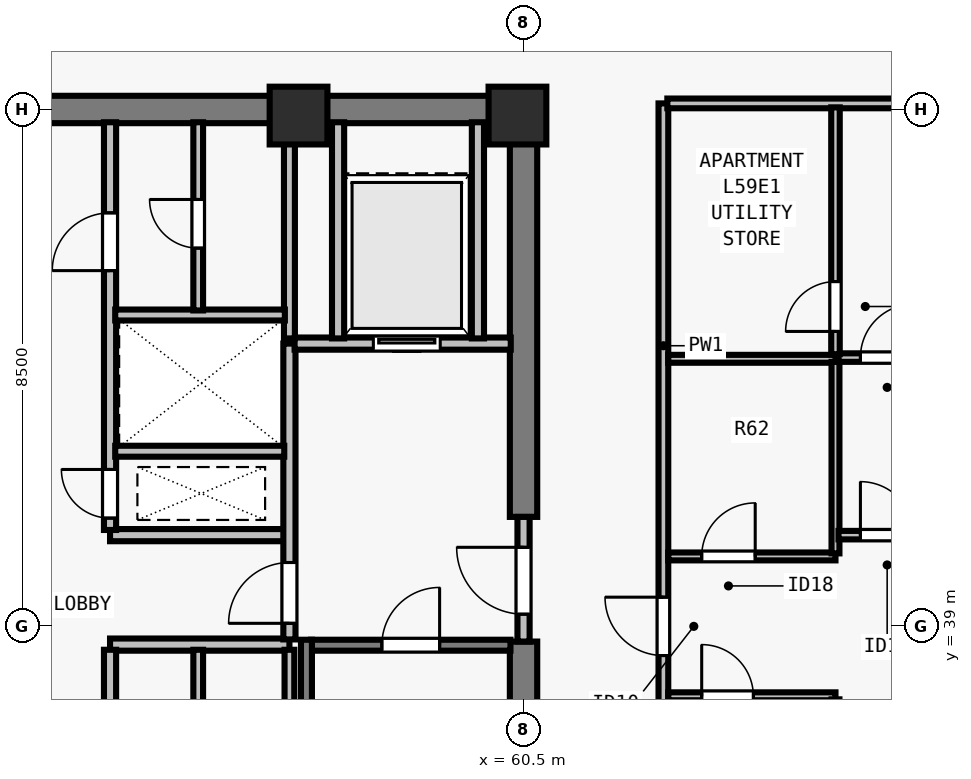
"""IFC4 building model, lengths in metres.
Left out: names, types, materials, properties, quantities, classifications, styles, units other than length and angle.
Written with IfcOpenShell. Run it as: python <this file> out.ifc"""

import sys

from ifc_helpers import new_model, si_unit, direction, frame, frame_2d, origin, origin_2d, place, context, subcontext, project, spatial, rectangle, extrude, element, fill, save


model = new_model("IFC4")
c1 = context("Model", 3, precision=1e-05, world=origin(), true_north=direction((0.0, 1.0)))
c2 = subcontext(c1, "Body", "Model", "MODEL_VIEW")
j1 = project(units=[si_unit("LENGTHUNIT", "METRE"), si_unit("PLANEANGLEUNIT", "RADIAN")], contexts=[c1])
p1 = place(None, origin())
s1 = spatial("IfcSite", under=j1, at=p1, CompositionType="ELEMENT")
p2 = place(p1, origin())
s2 = spatial("IfcBuilding", under=s1, at=p2, CompositionType="ELEMENT")
p3 = place(p2, frame((0.0, 0.0, 216.5)))
s3 = spatial("IfcBuildingStorey", under=s2, at=p3, CompositionType="ELEMENT", Elevation=216.5)
for number, where, z_axis, x_axis in (
    (1, (56.8, 47.4, 0.0), (0.0, 0.0, 1.0), (1.0, 0.0, 0.0)),
    (2, (60.4, 47.4, 0.0), (0.0, 0.0, 1.0), (1.0, 0.0, 0.0)),
):
    element("IfcColumn", number, at=place(p3, frame(where, z_axis=z_axis, x_axis=x_axis)), inside=s3, PredefinedType="COLUMN", context=c2, shape_type="SweptSolid", body=[
        extrude(rectangle(XDim=0.95, YDim=0.95, at=origin_2d()), origin(), (0.0, 0.0, 1.0), 3.5),
    ])
p4 = place(p3, frame((43.275, 47.5, 0.0), z_axis=(0.0, 0.0, 1.0), x_axis=(1.0, 0.0, 0.0)))
e3 = element("IfcWall", 3, at=p4, inside=s3, PredefinedType="SHEAR", context=c2, shape_type="SweptSolid", body=[
    extrude(rectangle(XDim=17.45, YDim=0.45, at=frame_2d((8.725, 0.0))), origin(), (0.0, 0.0, 1.0), 3.29),
])
p5 = place(p3, frame((60.5, 30.715, 0.0), z_axis=(0.0, 0.0, 1.0), x_axis=(0.0, 1.0, 0.0)))
e4 = element("IfcWall", 4, at=p5, inside=s3, PredefinedType="SHEAR", context=c2, shape_type="SweptSolid", body=[
    extrude(rectangle(XDim=8.035, YDim=0.45, at=frame_2d((4.018, 0.0))), origin(), (0.0, 0.0, 1.0), 3.29),
])
p6 = place(p3, frame((60.5, 40.8, 0.0), z_axis=(0.0, 0.0, 1.0), x_axis=(0.0, 1.0, 0.0)))
e5 = element("IfcWall", 5, at=p6, inside=s3, PredefinedType="SHEAR", context=c2, shape_type="SweptSolid", body=[
    extrude(rectangle(XDim=6.485, YDim=0.45, at=frame_2d((3.242, 0.0))), origin(), (0.0, 0.0, 1.0), 3.29),
])
for number, where, z_axis, x_axis in (
    (6, (53.7, 38.7, 0.0), (0.0, 0.0, 1.0), (1.0, 0.0, 0.0)),
    (7, (53.7, 40.5, 0.0), (0.0, 0.0, 1.0), (1.0, 0.0, 0.0)),
):
    element("IfcWall", number, at=place(p3, frame(where, z_axis=z_axis, x_axis=x_axis)), inside=s3, PredefinedType="SOLIDWALL", context=c2, shape_type="SweptSolid", body=[
        extrude(rectangle(XDim=2.95, YDim=0.2, at=frame_2d((1.475, 0.0))), origin(), (0.0, 0.0, 1.0), 3.29),
    ])
p7 = place(p3, frame((53.7, 30.71, 0.0), z_axis=(0.0, 0.0, 1.0), x_axis=(0.0, 1.0, 0.0)))
e8 = element("IfcWall", 8, at=p7, inside=s3, PredefinedType="SOLIDWALL", context=c2, shape_type="SweptSolid", body=[
    extrude(rectangle(XDim=7.905, YDim=0.2, at=frame_2d((3.953, 0.0))), origin(), (0.0, 0.0, 1.0), 3.29),
])
p8 = place(p7, frame((2.14, 0.0, 0.0)))
e9 = element("IfcOpeningElement", 9, at=p8, cuts=e8, PredefinedType="OPENING", context=c2, shape_type="SweptSolid", body=[
    extrude(rectangle(XDim=0.95, YDim=2.12, at=frame_2d((0.475, 1.06))), frame((0.0, 0.11, 0.0), z_axis=(0.0, -1.0, 0.0), x_axis=(1.0, 0.0, 0.0)), (0.0, 0.0, 1.0), 0.22),
])
p9 = place(p3, frame((53.7, 40.585, 0.0), z_axis=(0.0, 0.0, 1.0), x_axis=(0.0, 1.0, 0.0)))
e10 = element("IfcWall", 10, at=p9, inside=s3, PredefinedType="SOLIDWALL", context=c2, shape_type="SweptSolid", body=[
    extrude(rectangle(XDim=6.705, YDim=0.2, at=frame_2d((3.353, 0.0))), origin(), (0.0, 0.0, 1.0), 3.29),
])
p10 = place(p9, frame((0.195, 0.0, 0.0)))
e11 = element("IfcOpeningElement", 11, at=p10, cuts=e10, PredefinedType="OPENING", context=c2, shape_type="SweptSolid", body=[
    extrude(rectangle(XDim=0.8, YDim=2.08, at=frame_2d((0.4, 1.04))), frame((0.0, 0.11, 0.0), z_axis=(0.0, -1.0, 0.0), x_axis=(1.0, 0.0, 0.0)), (0.0, 0.0, 1.0), 0.22),
])
p11 = place(p9, frame((4.265, 0.0, 0.0)))
e12 = element("IfcOpeningElement", 12, at=p11, cuts=e10, PredefinedType="OPENING", context=c2, shape_type="SweptSolid", body=[
    extrude(rectangle(XDim=0.95, YDim=2.12, at=frame_2d((0.475, 1.06))), frame((0.0, 0.11, 0.0), z_axis=(0.0, -1.0, 0.0), x_axis=(1.0, 0.0, 0.0)), (0.0, 0.0, 1.0), 0.22),
])
p12 = place(p3, frame((60.5, 38.75, 0.0), z_axis=(0.0, 0.0, 1.0), x_axis=(0.0, 1.0, 0.0)))
e13 = element("IfcWall", 13, at=p12, inside=s3, PredefinedType="SOLIDWALL", context=c2, shape_type="SweptSolid", body=[
    extrude(rectangle(XDim=2.05, YDim=0.2, at=frame_2d((1.025, 0.0))), origin(), (0.0, 0.0, 1.0), 3.29),
])
p13 = place(p12, frame((0.45, 0.0, 0.0)))
e14 = element("IfcOpeningElement", 14, at=p13, cuts=e13, PredefinedType="OPENING", context=c2, shape_type="SweptSolid", body=[
    extrude(rectangle(XDim=1.1, YDim=2.15, at=frame_2d((0.55, 1.075))), frame((0.0, 0.11, 0.0), z_axis=(0.0, -1.0, 0.0), x_axis=(1.0, 0.0, 0.0)), (0.0, 0.0, 1.0), 0.22),
])
p14 = place(p3, frame((56.65, 38.785, 0.0), z_axis=(0.0, 0.0, 1.0), x_axis=(0.0, 1.0, 0.0)))
e15 = element("IfcWall", 15, at=p14, inside=s3, PredefinedType="SOLIDWALL", context=c2, shape_type="SweptSolid", body=[
    extrude(rectangle(XDim=4.865, YDim=0.2, at=frame_2d((2.433, 0.0))), origin(), (0.0, 0.0, 1.0), 3.29),
])
p15 = place(p14, frame((0.265, 0.0, 0.0)))
e16 = element("IfcOpeningElement", 16, at=p15, cuts=e15, PredefinedType="OPENING", context=c2, shape_type="SweptSolid", body=[
    extrude(rectangle(XDim=1.0, YDim=2.15, at=frame_2d((0.5, 1.075))), frame((0.0, 0.11, 0.0), z_axis=(0.0, -1.0, 0.0), x_axis=(1.0, 0.0, 0.0)), (0.0, 0.0, 1.0), 0.22),
])
p16 = place(p3, frame((56.735, 43.65, 0.0), z_axis=(0.0, 0.0, 1.0), x_axis=(1.0, 0.0, 0.0)))
e17 = element("IfcWall", 17, at=p16, inside=s3, PredefinedType="SOLIDWALL", context=c2, shape_type="SweptSolid", body=[
    extrude(rectangle(XDim=3.555, YDim=0.2, at=frame_2d((1.777, 0.0))), origin(), (0.0, 0.0, 1.0), 3.29),
])
p17 = place(p16, frame((1.295, 0.0, 0.0)))
e18 = element("IfcOpeningElement", 18, at=p17, cuts=e17, PredefinedType="OPENING", context=c2, shape_type="SweptSolid", body=[
    extrude(rectangle(XDim=1.1, YDim=2.2, at=frame_2d((0.55, 1.1))), frame((0.0, 0.11, 0.0), z_axis=(0.0, -1.0, 0.0), x_axis=(1.0, 0.0, 0.0)), (0.0, 0.0, 1.0), 0.22),
])
for number, where, z_axis, x_axis in (
    (19, (57.45, 43.735, 0.0), (0.0, 0.0, 1.0), (0.0, 1.0, 0.0)),
    (20, (59.75, 43.735, 0.0), (0.0, 0.0, 1.0), (0.0, 1.0, 0.0)),
):
    element("IfcWall", number, at=place(p3, frame(where, z_axis=z_axis, x_axis=x_axis)), inside=s3, PredefinedType="SOLIDWALL", context=c2, shape_type="SweptSolid", body=[
        extrude(rectangle(XDim=3.555, YDim=0.2, at=frame_2d((1.777, 0.0))), origin(), (0.0, 0.0, 1.0), 3.29),
    ])
p18 = place(p3, frame((56.65, 30.71, 0.0), z_axis=(0.0, 0.0, 1.0), x_axis=(0.0, 1.0, 0.0)))
e21 = element("IfcWall", 21, at=p18, inside=s3, PredefinedType="PARTITIONING", context=c2, shape_type="SweptSolid", body=[
    extrude(rectangle(XDim=7.905, YDim=0.16, at=frame_2d((3.953, 0.0))), origin(), (0.0, 0.0, 1.0), 3.29),
])
p19 = place(p3, frame((55.15, 30.71, 0.0), z_axis=(0.0, 0.0, 1.0), x_axis=(0.0, 1.0, 0.0)))
e22 = element("IfcWall", 22, at=p19, inside=s3, PredefinedType="PARTITIONING", context=c2, shape_type="SweptSolid", body=[
    extrude(rectangle(XDim=7.905, YDim=0.16, at=frame_2d((3.953, 0.0))), origin(), (0.0, 0.0, 1.0), 3.29),
])
p20 = place(p19, frame((3.54, 0.0, 0.0)))
e23 = element("IfcOpeningElement", 23, at=p20, cuts=e22, PredefinedType="OPENING", context=c2, shape_type="SweptSolid", body=[
    extrude(rectangle(XDim=0.85, YDim=2.12, at=frame_2d((0.425, 1.06))), frame((0.0, 0.09, 0.0), z_axis=(0.0, -1.0, 0.0), x_axis=(1.0, 0.0, 0.0)), (0.0, 0.0, 1.0), 0.18),
])
p21 = place(p3, frame((56.65, 43.735, 0.0), z_axis=(0.0, 0.0, 1.0), x_axis=(0.0, 1.0, 0.0)))
e24 = element("IfcWall", 24, at=p21, inside=s3, PredefinedType="SOLIDWALL", context=c2, shape_type="SweptSolid", body=[
    extrude(rectangle(XDim=3.555, YDim=0.18, at=frame_2d((1.777, 0.0))), origin(), (0.0, 0.0, 1.0), 3.29),
])
p22 = place(p3, frame((53.785, 41.88, 0.0), z_axis=(0.0, 0.0, 1.0), x_axis=(1.0, 0.0, 0.0)))
e25 = element("IfcWall", 25, at=p22, inside=s3, PredefinedType="SOLIDWALL", context=c2, shape_type="SweptSolid", body=[
    extrude(rectangle(XDim=2.78, YDim=0.18, at=frame_2d((1.39, 0.0))), origin(), (0.0, 0.0, 1.0), 3.29),
])
p23 = place(p3, frame((53.785, 44.12, 0.0), z_axis=(0.0, 0.0, 1.0), x_axis=(1.0, 0.0, 0.0)))
e26 = element("IfcWall", 26, at=p23, inside=s3, PredefinedType="SOLIDWALL", context=c2, shape_type="SweptSolid", body=[
    extrude(rectangle(XDim=2.79, YDim=0.18, at=frame_2d((1.395, 0.0))), origin(), (0.0, 0.0, 1.0), 3.29),
])
p24 = place(p3, frame((55.15, 44.195, 0.0), z_axis=(0.0, 0.0, 1.0), x_axis=(0.0, 1.0, 0.0)))
e27 = element("IfcWall", 27, at=p24, inside=s3, PredefinedType="PARTITIONING", context=c2, shape_type="SweptSolid", body=[
    extrude(rectangle(XDim=3.095, YDim=0.16, at=frame_2d((1.547, 0.0))), origin(), (0.0, 0.0, 1.0), 3.29),
])
p25 = place(p24, frame((1.025, 0.0, 0.0)))
e28 = element("IfcOpeningElement", 28, at=p25, cuts=e27, PredefinedType="OPENING", context=c2, shape_type="SweptSolid", body=[
    extrude(rectangle(XDim=0.8, YDim=2.1, at=frame_2d((0.4, 1.05))), frame((0.0, 0.09, 0.0), z_axis=(0.0, -1.0, 0.0), x_axis=(1.0, 0.0, 0.0)), (0.0, 0.0, 1.0), 0.18),
])
p26 = place(p3, frame((62.8, 30.4, 0.0), z_axis=(0.0, 0.0, 1.0), x_axis=(0.0, 1.0, 0.0)))
e29 = element("IfcWall", 29, at=p26, inside=s3, PredefinedType="PARTITIONING", context=c2, shape_type="SweptSolid", body=[
    extrude(rectangle(XDim=17.2, YDim=0.16, at=frame_2d((8.6, 0.0))), origin(), (0.0, 0.0, 1.0), 3.29),
])
p27 = place(p26, frame((8.12, 0.0, 0.0)))
e30 = element("IfcOpeningElement", 30, at=p27, cuts=e29, PredefinedType="OPENING", context=c2, shape_type="SweptSolid", body=[
    extrude(rectangle(XDim=0.96, YDim=2.18, at=frame_2d((0.48, 1.09))), frame((0.0, 0.09, 0.0), z_axis=(0.0, -1.0, 0.0), x_axis=(1.0, 0.0, 0.0)), (0.0, 0.0, 1.0), 0.18),
])
p28 = place(p3, frame((62.865, 47.6, 0.0), z_axis=(0.0, 0.0, 1.0), x_axis=(1.0, 0.0, 0.0)))
e31 = element("IfcWall", 31, at=p28, inside=s3, PredefinedType="PARTITIONING", context=c2, shape_type="SweptSolid", body=[
    extrude(rectangle(XDim=11.33, YDim=0.16, at=frame_2d((5.665, 0.0))), origin(), (0.0, 0.0, 1.0), 3.29),
])
p29 = place(p3, frame((62.88, 37.85, 0.0), z_axis=(0.0, 0.0, 1.0), x_axis=(1.0, 0.0, 0.0)))
e32 = element("IfcWall", 32, at=p29, inside=s3, PredefinedType="PLUMBINGWALL", context=c2, shape_type="SweptSolid", body=[
    extrude(rectangle(XDim=2.75, YDim=0.13, at=frame_2d((1.375, 0.0))), origin(), (0.0, 0.0, 1.0), 3.29),
])
p30 = place(p29, frame((0.55, 0.0, 0.0)))
e33 = element("IfcOpeningElement", 33, at=p30, cuts=e32, PredefinedType="OPENING", context=c2, shape_type="SweptSolid", body=[
    extrude(rectangle(XDim=0.85, YDim=2.08, at=frame_2d((0.425, 1.04))), frame((0.0, 0.075, 0.0), z_axis=(0.0, -1.0, 0.0), x_axis=(1.0, 0.0, 0.0)), (0.0, 0.0, 1.0), 0.15),
])
p31 = place(p3, frame((62.88, 43.4, 0.0), z_axis=(0.0, 0.0, 1.0), x_axis=(1.0, 0.0, 0.0)))
e34 = element("IfcWall", 34, at=p31, inside=s3, PredefinedType="PLUMBINGWALL", context=c2, shape_type="SweptSolid", body=[
    extrude(rectangle(XDim=2.75, YDim=0.13, at=frame_2d((1.375, 0.0))), origin(), (0.0, 0.0, 1.0), 3.29),
])
p32 = place(p3, frame((62.88, 40.15, 0.0), z_axis=(0.0, 0.0, 1.0), x_axis=(1.0, 0.0, 0.0)))
e35 = element("IfcWall", 35, at=p32, inside=s3, PredefinedType="PLUMBINGWALL", context=c2, shape_type="SweptSolid", body=[
    extrude(rectangle(XDim=2.75, YDim=0.13, at=frame_2d((1.375, 0.0))), origin(), (0.0, 0.0, 1.0), 3.29),
])
p33 = place(p32, frame((0.55, 0.0, 0.0)))
e36 = element("IfcOpeningElement", 36, at=p33, cuts=e35, PredefinedType="OPENING", context=c2, shape_type="SweptSolid", body=[
    extrude(rectangle(XDim=0.88, YDim=2.1, at=frame_2d((0.44, 1.05))), frame((0.0, 0.075, 0.0), z_axis=(0.0, -1.0, 0.0), x_axis=(1.0, 0.0, 0.0)), (0.0, 0.0, 1.0), 0.15),
])
p34 = place(p3, frame((65.63, 40.2, 0.0), z_axis=(0.0, 0.0, 1.0), x_axis=(0.0, 1.0, 0.0)))
e37 = element("IfcWall", 37, at=p34, inside=s3, PredefinedType="PLUMBINGWALL", context=c2, shape_type="SweptSolid", body=[
    extrude(rectangle(XDim=3.15, YDim=0.13, at=frame_2d((1.575, 0.0))), origin(), (0.0, 0.0, 1.0), 3.29),
])
p35 = place(p3, frame((65.68, 43.42, 0.0), z_axis=(0.0, 0.0, 1.0), x_axis=(1.0, 0.0, 0.0)))
e38 = element("IfcWall", 38, at=p35, inside=s3, PredefinedType="PARTITIONING", context=c2, shape_type="SweptSolid", body=[
    extrude(rectangle(XDim=8.44, YDim=0.14, at=frame_2d((4.22, 0.0))), origin(), (0.0, 0.0, 1.0), 3.29),
])
p36 = place(p35, frame((0.36, 0.0, 0.0)))
e39 = element("IfcOpeningElement", 39, at=p36, cuts=e38, PredefinedType="OPENING", context=c2, shape_type="SweptSolid", body=[
    extrude(rectangle(XDim=0.88, YDim=2.1, at=frame_2d((0.44, 1.05))), frame((0.0, 0.08, 0.0), z_axis=(0.0, -1.0, 0.0), x_axis=(1.0, 0.0, 0.0)), (0.0, 0.0, 1.0), 0.16),
])
p37 = place(p3, frame((65.63, 43.475, 0.0), z_axis=(0.0, 0.0, 1.0), x_axis=(0.0, 1.0, 0.0)))
e40 = element("IfcWall", 40, at=p37, inside=s3, PredefinedType="PARTITIONING", context=c2, shape_type="SweptSolid", body=[
    extrude(rectangle(XDim=4.06, YDim=0.14, at=frame_2d((2.03, 0.0))), origin(), (0.0, 0.0, 1.0), 3.29),
])
p38 = place(p37, frame((0.375, 0.0, 0.0)))
e41 = element("IfcOpeningElement", 41, at=p38, cuts=e40, PredefinedType="OPENING", context=c2, shape_type="SweptSolid", body=[
    extrude(rectangle(XDim=0.82, YDim=2.1, at=frame_2d((0.41, 1.05))), frame((0.0, 0.08, 0.0), z_axis=(0.0, -1.0, 0.0), x_axis=(1.0, 0.0, 0.0)), (0.0, 0.0, 1.0), 0.16),
])
p39 = place(p3, frame((65.68, 40.5, 0.0), z_axis=(0.0, 0.0, 1.0), x_axis=(1.0, 0.0, 0.0)))
e42 = element("IfcWall", 42, at=p39, inside=s3, PredefinedType="PARTITIONING", context=c2, shape_type="SweptSolid", body=[
    extrude(rectangle(XDim=8.44, YDim=0.14, at=frame_2d((4.22, 0.0))), origin(), (0.0, 0.0, 1.0), 3.29),
])
p40 = place(p39, frame((0.36, 0.0, 0.0)))
e43 = element("IfcOpeningElement", 43, at=p40, cuts=e42, PredefinedType="OPENING", context=c2, shape_type="SweptSolid", body=[
    extrude(rectangle(XDim=0.88, YDim=2.1, at=frame_2d((0.44, 1.05))), frame((0.0, 0.08, 0.0), z_axis=(0.0, -1.0, 0.0), x_axis=(1.0, 0.0, 0.0)), (0.0, 0.0, 1.0), 0.16),
])
p41 = place(p3, frame((57.005, 38.69, 0.0), z_axis=(0.0, 0.0, 1.0), x_axis=(1.0, 0.0, 0.0)))
e44 = element("IfcWall", 44, at=p41, inside=s3, PredefinedType="SOLIDWALL", context=c2, shape_type="SweptSolid", body=[
    extrude(rectangle(XDim=3.28, YDim=0.18, at=frame_2d((1.64, 0.0))), origin(), (0.0, 0.0, 1.0), 3.29),
])
p42 = place(p41, frame((1.165, 0.0, 0.0)))
e45 = element("IfcOpeningElement", 45, at=p42, cuts=e44, PredefinedType="OPENING", context=c2, shape_type="SweptSolid", body=[
    extrude(rectangle(XDim=0.95, YDim=2.15, at=frame_2d((0.475, 1.075))), frame((0.0, 0.1, 0.0), z_axis=(0.0, -1.0, 0.0), x_axis=(1.0, 0.0, 0.0)), (0.0, 0.0, 1.0), 0.2),
])
p43 = place(p3, frame((56.93, 38.78, 0.0), z_axis=(0.0, 0.0, 1.0), x_axis=(0.0, -1.0, 0.0)))
e46 = element("IfcWall", 46, at=p43, inside=s3, PredefinedType="SOLIDWALL", context=c2, shape_type="SweptSolid", body=[
    extrude(rectangle(XDim=8.067, YDim=0.18, at=frame_2d((4.034, 0.0))), origin(), (0.0, 0.0, 1.0), 3.29),
])
p44 = place(p13, origin())
e47 = element("IfcDoor", 47, at=p44, inside=s3, OperationType="SINGLE_SWING_RIGHT", PredefinedType="DOOR", context=c2, shape_type="SweptSolid", body=[
    extrude(rectangle(XDim=1.1, YDim=2.15, at=frame_2d((0.55, 1.075))), frame((0.0, 0.025, 0.0), z_axis=(0.0, -1.0, 0.0), x_axis=(1.0, 0.0, 0.0)), (0.0, 0.0, 1.0), 0.05),
])
fill(e14, e47)
p45 = place(p15, origin())
e48 = element("IfcDoor", 48, at=p45, inside=s3, OperationType="SINGLE_SWING_LEFT", PredefinedType="DOOR", context=c2, shape_type="SweptSolid", body=[
    extrude(rectangle(XDim=1.0, YDim=2.15, at=frame_2d((0.5, 1.075))), frame((0.0, 0.025, 0.0), z_axis=(0.0, -1.0, 0.0), x_axis=(1.0, 0.0, 0.0)), (0.0, 0.0, 1.0), 0.05),
])
fill(e16, e48)
p46 = place(p17, origin())
e49 = element("IfcDoor", 49, at=p46, inside=s3, OperationType="SLIDING_TO_LEFT", PredefinedType="DOOR", context=c2, shape_type="SweptSolid", body=[
    extrude(rectangle(XDim=1.1, YDim=2.2, at=frame_2d((0.55, 1.1))), frame((0.0, 0.025, 0.0), z_axis=(0.0, -1.0, 0.0), x_axis=(1.0, 0.0, 0.0)), (0.0, 0.0, 1.0), 0.05),
])
fill(e18, e49)
p47 = place(p10, origin())
e50 = element("IfcDoor", 50, at=p47, inside=s3, OperationType="SINGLE_SWING_RIGHT", PredefinedType="DOOR", context=c2, shape_type="SweptSolid", body=[
    extrude(rectangle(XDim=0.8, YDim=2.08, at=frame_2d((0.4, 1.04))), frame((0.0, 0.025, 0.0), z_axis=(0.0, -1.0, 0.0), x_axis=(1.0, 0.0, 0.0)), (0.0, 0.0, 1.0), 0.05),
])
fill(e11, e50)
p48 = place(p11, origin())
e51 = element("IfcDoor", 51, at=p48, inside=s3, OperationType="SINGLE_SWING_LEFT", PredefinedType="DOOR", context=c2, shape_type="SweptSolid", body=[
    extrude(rectangle(XDim=0.95, YDim=2.12, at=frame_2d((0.475, 1.06))), frame((0.0, 0.025, 0.0), z_axis=(0.0, -1.0, 0.0), x_axis=(1.0, 0.0, 0.0)), (0.0, 0.0, 1.0), 0.05),
])
fill(e12, e51)
p49 = place(p25, origin())
e52 = element("IfcDoor", 52, at=p49, inside=s3, OperationType="SINGLE_SWING_RIGHT", PredefinedType="DOOR", context=c2, shape_type="SweptSolid", body=[
    extrude(rectangle(XDim=0.8, YDim=2.1, at=frame_2d((0.4, 1.05))), frame((0.0, 0.025, 0.0), z_axis=(0.0, -1.0, 0.0), x_axis=(1.0, 0.0, 0.0)), (0.0, 0.0, 1.0), 0.05),
])
fill(e28, e52)
p50 = place(p30, origin())
e53 = element("IfcDoor", 53, at=p50, inside=s3, OperationType="SINGLE_SWING_LEFT", PredefinedType="DOOR", context=c2, shape_type="SweptSolid", body=[
    extrude(rectangle(XDim=0.85, YDim=2.08, at=frame_2d((0.425, 1.04))), frame((0.0, 0.025, 0.0), z_axis=(0.0, -1.0, 0.0), x_axis=(1.0, 0.0, 0.0)), (0.0, 0.0, 1.0), 0.05),
])
fill(e33, e53)
p51 = place(p33, origin())
e54 = element("IfcDoor", 54, at=p51, inside=s3, OperationType="SINGLE_SWING_RIGHT", PredefinedType="DOOR", context=c2, shape_type="SweptSolid", body=[
    extrude(rectangle(XDim=0.88, YDim=2.1, at=frame_2d((0.44, 1.05))), frame((0.0, 0.025, 0.0), z_axis=(0.0, -1.0, 0.0), x_axis=(1.0, 0.0, 0.0)), (0.0, 0.0, 1.0), 0.05),
])
fill(e36, e54)
p52 = place(p38, origin())
e55 = element("IfcDoor", 55, at=p52, inside=s3, OperationType="SINGLE_SWING_LEFT", PredefinedType="DOOR", context=c2, shape_type="SweptSolid", body=[
    extrude(rectangle(XDim=0.82, YDim=2.1, at=frame_2d((0.41, 1.05))), frame((0.0, 0.025, 0.0), z_axis=(0.0, -1.0, 0.0), x_axis=(1.0, 0.0, 0.0)), (0.0, 0.0, 1.0), 0.05),
])
fill(e41, e55)
p53 = place(p36, origin())
e56 = element("IfcDoor", 56, at=p53, inside=s3, OperationType="SINGLE_SWING_RIGHT", PredefinedType="DOOR", context=c2, shape_type="SweptSolid", body=[
    extrude(rectangle(XDim=0.88, YDim=2.1, at=frame_2d((0.44, 1.05))), frame((0.0, 0.025, 0.0), z_axis=(0.0, -1.0, 0.0), x_axis=(1.0, 0.0, 0.0)), (0.0, 0.0, 1.0), 0.05),
])
fill(e39, e56)
p54 = place(p40, origin())
e57 = element("IfcDoor", 57, at=p54, inside=s3, OperationType="SINGLE_SWING_LEFT", PredefinedType="DOOR", context=c2, shape_type="SweptSolid", body=[
    extrude(rectangle(XDim=0.88, YDim=2.1, at=frame_2d((0.44, 1.05))), frame((0.0, 0.025, 0.0), z_axis=(0.0, -1.0, 0.0), x_axis=(1.0, 0.0, 0.0)), (0.0, 0.0, 1.0), 0.05),
])
fill(e43, e57)
p55 = place(p27, origin())
e58 = element("IfcDoor", 58, at=p55, inside=s3, OperationType="SINGLE_SWING_RIGHT", PredefinedType="DOOR", context=c2, shape_type="SweptSolid", body=[
    extrude(rectangle(XDim=0.96, YDim=2.18, at=frame_2d((0.48, 1.09))), frame((0.0, 0.025, 0.0), z_axis=(0.0, -1.0, 0.0), x_axis=(1.0, 0.0, 0.0)), (0.0, 0.0, 1.0), 0.05),
])
fill(e30, e58)
p56 = place(p42, origin())
e59 = element("IfcDoor", 59, at=p56, inside=s3, OperationType="SINGLE_SWING_RIGHT", PredefinedType="DOOR", context=c2, shape_type="SweptSolid", body=[
    extrude(rectangle(XDim=0.95, YDim=2.15, at=frame_2d((0.475, 1.075))), frame((0.0, 0.025, 0.0), z_axis=(0.0, -1.0, 0.0), x_axis=(1.0, 0.0, 0.0)), (0.0, 0.0, 1.0), 0.05),
])
fill(e45, e59)
save(model, sys.argv[1])
